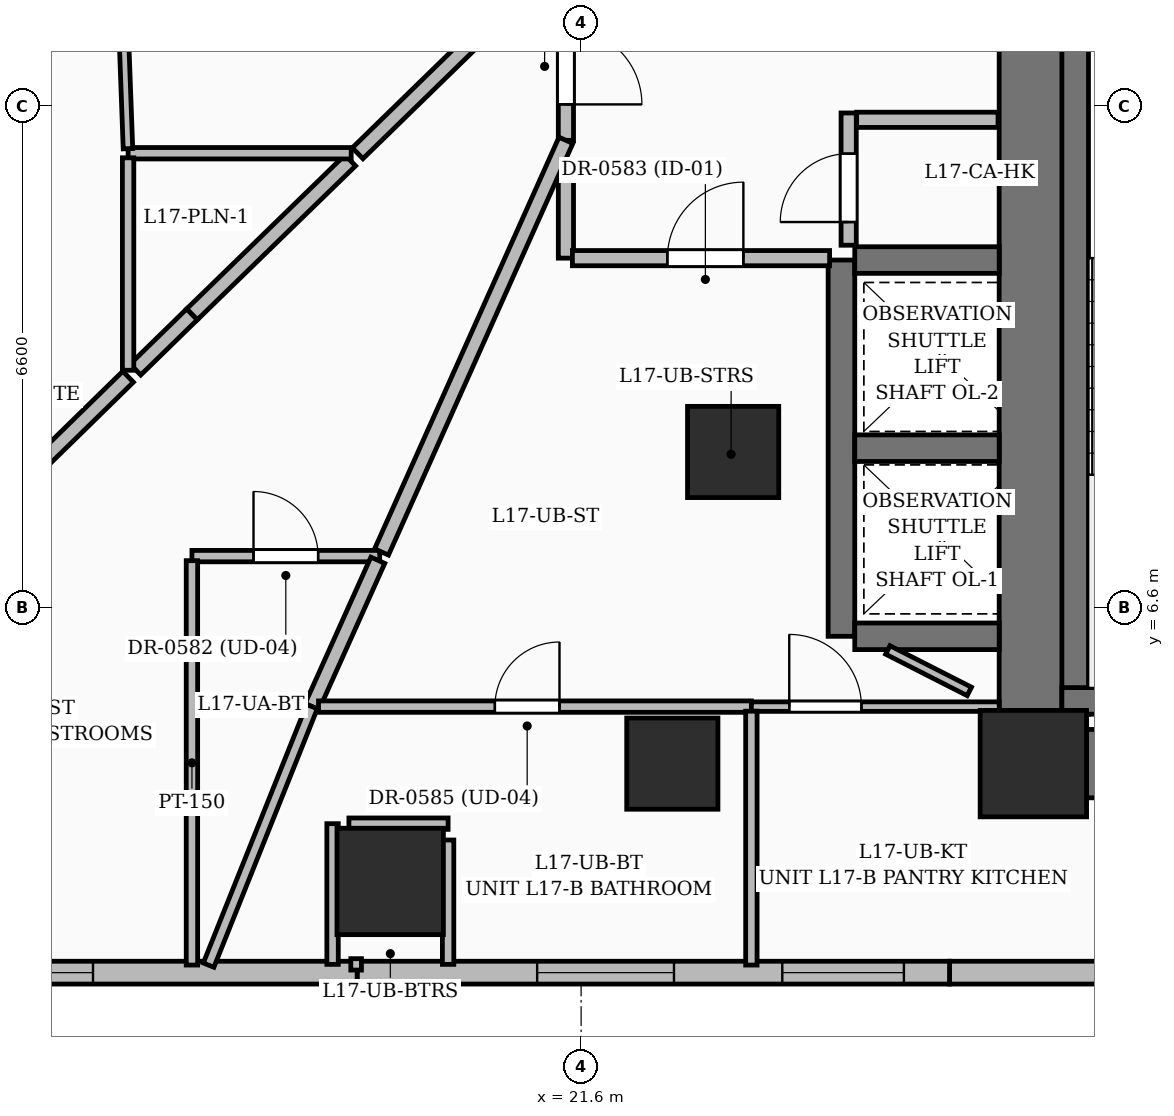
"""IFC4 building model, lengths in metres.
Left out: names, types, materials, properties, quantities, classifications, styles, units other than length and angle.
Written with IfcOpenShell. Run it as: python <this file> out.ifc"""

import sys

from ifc_helpers import new_model, si_unit, direction, frame, frame_2d, origin, origin_2d, place, context, subcontext, project, spatial, rectangle, extrude, element, fill, save


model = new_model("IFC4")
c1 = context("Model", 3, precision=1e-05, world=origin(), true_north=direction((0.0, 1.0)))
c2 = subcontext(c1, "Body", "Model", "MODEL_VIEW")
j1 = project(units=[si_unit("LENGTHUNIT", "METRE"), si_unit("PLANEANGLEUNIT", "RADIAN")], contexts=[c1])
p1 = place(None, origin())
s1 = spatial("IfcSite", under=j1, at=p1, CompositionType="ELEMENT")
p2 = place(p1, origin())
s2 = spatial("IfcBuilding", under=s1, at=p2, CompositionType="ELEMENT")
p3 = place(p2, frame((0.0, 0.0, 71.4)))
s3 = spatial("IfcBuildingStorey", under=s2, at=p3, CompositionType="ELEMENT", Elevation=71.4)
p4 = place(p3, frame((27.55, 4.55, 0.0), z_axis=(0.0, 0.0, 1.0), x_axis=(1.0, 0.0, 0.0)))
e1 = element("IfcColumn", 1, at=p4, inside=s3, PredefinedType="COLUMN", context=c2, shape_type="SweptSolid", body=[
    extrude(rectangle(XDim=1.4, YDim=1.4, at=origin_2d()), origin(), (0.0, 0.0, 1.0), 3.6),
])
for number, where, z_axis, x_axis in (
    (2, (22.8, 4.55, 0.0), (0.0, 0.0, 1.0), (1.0, 0.0, 0.0)),
    (3, (23.6, 8.65, 0.0), (0.0, 0.0, 1.0), (1.0, 0.0, 0.0)),
):
    element("IfcColumn", number, at=place(p3, frame(where, z_axis=z_axis, x_axis=x_axis)), inside=s3, PredefinedType="COLUMN", context=c2, shape_type="SweptSolid", body=[
        extrude(rectangle(XDim=1.2, YDim=1.2, at=origin_2d()), origin(), (0.0, 0.0, 1.0), 3.6),
    ])
p5 = place(p3, frame((28.25, 4.55, 0.0), z_axis=(0.0, 0.0, 1.0), x_axis=(1.0, 0.0, 0.0)))
e4 = element("IfcWall", 4, at=p5, inside=s3, PredefinedType="SHEAR", context=c2, shape_type="SweptSolid", body=[
    extrude(rectangle(XDim=6.2, YDim=0.9, at=frame_2d((3.1, 0.0))), origin(), (0.0, 0.0, 1.0), 3.6),
])
p6 = place(p3, frame((27.55, 5.25, 0.0), z_axis=(0.0, 0.0, 1.0), x_axis=(0.0, 1.0, 0.0)))
e5 = element("IfcWall", 5, at=p6, inside=s3, PredefinedType="SHEAR", context=c2, shape_type="SweptSolid", body=[
    extrude(rectangle(XDim=8.8, YDim=0.9, at=frame_2d((4.4, 0.0))), origin(), (0.0, 0.0, 1.0), 3.6),
])
p7 = place(p3, frame((28.1, 5.2, 0.0), z_axis=(0.0, 0.0, 1.0), x_axis=(0.0, 1.0, 0.0)))
e6 = element("IfcWall", 6, at=p7, inside=s3, PredefinedType="SOLIDWALL", context=c2, shape_type="SweptSolid", body=[
    extrude(rectangle(XDim=9.1, YDim=0.35, at=frame_2d((4.55, 0.0))), origin(), (0.0, 0.0, 1.0), 3.6),
])
p8 = place(p3, frame((27.925, 5.375, 0.0), z_axis=(0.0, 0.0, 1.0), x_axis=(1.0, 0.0, 0.0)))
e7 = element("IfcWall", 7, at=p8, inside=s3, PredefinedType="SOLIDWALL", context=c2, shape_type="SweptSolid", body=[
    extrude(rectangle(XDim=3.55, YDim=0.35, at=frame_2d((1.775, 0.0))), origin(), (0.0, 0.0, 1.0), 3.6),
])
p9 = place(p3, frame((25.025, 6.225, 0.0), z_axis=(0.0, 0.0, 1.0), x_axis=(0.0, 1.0, 0.0)))
e8 = element("IfcWall", 8, at=p9, inside=s3, PredefinedType="SOLIDWALL", context=c2, shape_type="SweptSolid", body=[
    extrude(rectangle(XDim=4.95, YDim=0.35, at=frame_2d((2.475, 0.0))), origin(), (0.0, 0.0, 1.0), 3.6),
])
for number, where, z_axis, x_axis in (
    (9, (25.2, 6.225, 0.0), (0.0, 0.0, 1.0), (1.0, 0.0, 0.0)),
    (10, (25.2, 8.7, 0.0), (0.0, 0.0, 1.0), (1.0, 0.0, 0.0)),
    (11, (25.2, 11.175, 0.0), (0.0, 0.0, 1.0), (1.0, 0.0, 0.0)),
):
    element("IfcWall", number, at=place(p3, frame(where, z_axis=z_axis, x_axis=x_axis)), inside=s3, PredefinedType="SOLIDWALL", context=c2, shape_type="SweptSolid", body=[
        extrude(rectangle(XDim=1.9, YDim=0.35, at=frame_2d((0.95, 0.0))), origin(), (0.0, 0.0, 1.0), 3.6),
    ])
p10 = place(p3, frame((19.088, 3.0, 0.0), z_axis=(0.0, 0.0, 1.0), x_axis=(1.0, 0.0, 0.0)))
e12 = element("IfcColumn", 12, at=p10, inside=s3, PredefinedType="COLUMN", context=c2, shape_type="SweptSolid", body=[
    extrude(rectangle(XDim=1.4, YDim=1.4, at=origin_2d()), origin(), (0.0, 0.0, 1.0), 3.6),
])
p11 = place(p3, frame((33.965, 1.8, 0.0), z_axis=(0.0, 0.0, 1.0), x_axis=(-1.0, 0.0, 0.0)))
e13 = element("IfcWall", 13, at=p11, inside=s3, PredefinedType="SOLIDWALL", context=c2, shape_type="SweptSolid", body=[
    extrude(rectangle(XDim=7.518, YDim=0.3, at=frame_2d((3.759, 0.0))), origin(), (0.0, 0.0, 1.0), 3.35),
])
p12 = place(p11, frame((2.45, 0.0, 0.55)))
e14 = element("IfcOpeningElement", 14, at=p12, cuts=e13, PredefinedType="OPENING", context=c2, shape_type="SweptSolid", body=[
    extrude(rectangle(XDim=2.1, YDim=2.4, at=frame_2d((1.05, 1.2))), frame((0.0, 0.16, 0.0), z_axis=(0.0, -1.0, 0.0), x_axis=(1.0, 0.0, 0.0)), (0.0, 0.0, 1.0), 0.32),
])
p13 = place(p3, frame((26.447, 1.8, 0.0), z_axis=(0.0, 0.0, 1.0), x_axis=(-1.0, 0.0, 0.0)))
e15 = element("IfcWall", 15, at=p13, inside=s3, PredefinedType="SOLIDWALL", context=c2, shape_type="SweptSolid", body=[
    extrude(rectangle(XDim=7.793, YDim=0.3, at=frame_2d((3.897, 0.0))), origin(), (0.0, 0.0, 1.0), 3.35),
])
p14 = place(p13, frame((3.625, 0.0, 0.6)))
e16 = element("IfcOpeningElement", 16, at=p14, cuts=e15, PredefinedType="OPENING", context=c2, shape_type="SweptSolid", body=[
    extrude(rectangle(XDim=1.8, YDim=2.1, at=frame_2d((0.9, 1.05))), frame((0.0, 0.16, 0.0), z_axis=(0.0, -1.0, 0.0), x_axis=(1.0, 0.0, 0.0)), (0.0, 0.0, 1.0), 0.32),
])
p15 = place(p13, frame((0.6, 0.0, 0.55)))
e17 = element("IfcOpeningElement", 17, at=p15, cuts=e15, PredefinedType="OPENING", context=c2, shape_type="SweptSolid", body=[
    extrude(rectangle(XDim=1.6, YDim=2.2, at=frame_2d((0.8, 1.1))), frame((0.0, 0.16, 0.0), z_axis=(0.0, -1.0, 0.0), x_axis=(1.0, 0.0, 0.0)), (0.0, 0.0, 1.0), 0.32),
])
p16 = place(p3, frame((18.653, 1.8, 0.0), z_axis=(0.0, 0.0, 1.0), x_axis=(-1.0, 0.0, 0.0)))
e18 = element("IfcWall", 18, at=p16, inside=s3, PredefinedType="SOLIDWALL", context=c2, shape_type="SweptSolid", body=[
    extrude(rectangle(XDim=7.793, YDim=0.3, at=frame_2d((3.896, 0.0))), origin(), (0.0, 0.0, 1.0), 3.35),
])
p17 = place(p16, frame((3.475, 0.0, 0.55)))
e19 = element("IfcOpeningElement", 19, at=p17, cuts=e18, PredefinedType="OPENING", context=c2, shape_type="SweptSolid", body=[
    extrude(rectangle(XDim=1.6, YDim=2.2, at=frame_2d((0.8, 1.1))), frame((0.0, 0.16, 0.0), z_axis=(0.0, -1.0, 0.0), x_axis=(1.0, 0.0, 0.0)), (0.0, 0.0, 1.0), 0.32),
])
p18 = place(p3, frame((12.386, 12.079, 0.0), z_axis=(0.0, 0.0, 1.0), x_axis=(0.539509086386, 0.841979777493, 0.0)))
e20 = element("IfcWall", 20, at=p18, inside=s3, PredefinedType="SOLIDWALL", context=c2, shape_type="SweptSolid", body=[
    extrude(rectangle(XDim=7.149, YDim=0.3, at=frame_2d((3.574, 0.0))), origin(), (0.0, 0.0, 1.0), 3.35),
])
p19 = place(p18, frame((1.85, 0.0, 0.55)))
e21 = element("IfcOpeningElement", 21, at=p19, cuts=e20, PredefinedType="OPENING", context=c2, shape_type="SweptSolid", body=[
    extrude(rectangle(XDim=1.6, YDim=2.2, at=frame_2d((0.8, 1.1))), frame((0.0, 0.16, 0.0), z_axis=(0.0, -1.0, 0.0), x_axis=(1.0, 0.0, 0.0)), (0.0, 0.0, 1.0), 0.32),
])
p20 = place(p3, frame((25.12, 11.37, 0.0), z_axis=(0.0, 0.0, 1.0), x_axis=(0.0, 1.0, 0.0)))
e22 = element("IfcWall", 22, at=p20, inside=s3, PredefinedType="PARTITIONING", context=c2, shape_type="SweptSolid", body=[
    extrude(rectangle(XDim=1.74, YDim=0.2, at=frame_2d((0.87, 0.0))), origin(), (0.0, 0.0, 1.0), 3.35),
])
p21 = place(p20, frame((0.305, 0.0, 0.0)))
e23 = element("IfcOpeningElement", 23, at=p21, cuts=e22, PredefinedType="OPENING", context=c2, shape_type="SweptSolid", body=[
    extrude(rectangle(XDim=0.9, YDim=2.1, at=frame_2d((0.45, 1.05))), frame((0.0, 0.11, 0.0), z_axis=(0.0, -1.0, 0.0), x_axis=(1.0, 0.0, 0.0)), (0.0, 0.0, 1.0), 0.22),
])
p22 = place(p3, frame((25.225, 13.02, 0.0), z_axis=(0.0, 0.0, 1.0), x_axis=(1.0, 0.0, 0.0)))
e24 = element("IfcWall", 24, at=p22, inside=s3, PredefinedType="PARTITIONING", context=c2, shape_type="SweptSolid", body=[
    extrude(rectangle(XDim=1.86, YDim=0.2, at=frame_2d((0.93, 0.0))), origin(), (0.0, 0.0, 1.0), 3.35),
])
p23 = place(p3, frame((21.4, 15.09, 0.0), z_axis=(0.0, 0.0, 1.0), x_axis=(0.0, -1.0, 0.0)))
e25 = element("IfcWall", 25, at=p23, inside=s3, PredefinedType="PARTITIONING", context=c2, shape_type="SweptSolid", body=[
    extrude(rectangle(XDim=2.34, YDim=0.2, at=frame_2d((1.17, 0.0))), origin(), (0.0, 0.0, 1.0), 2.86),
])
p24 = place(p23, frame((0.867, 0.0, 0.0)))
e26 = element("IfcOpeningElement", 26, at=p24, cuts=e25, PredefinedType="OPENING", context=c2, shape_type="SweptSolid", body=[
    extrude(rectangle(XDim=1.0, YDim=2.2, at=frame_2d((0.5, 1.1))), frame((0.0, 0.11, 0.0), z_axis=(0.0, -1.0, 0.0), x_axis=(1.0, 0.0, 0.0)), (0.0, 0.0, 1.0), 0.22),
])
p25 = place(p3, frame((21.4, 12.261, 0.0), z_axis=(0.0, 0.0, 1.0), x_axis=(0.0, -1.0, 0.0)))
e27 = element("IfcWall", 27, at=p25, inside=s3, PredefinedType="PARTITIONING", context=c2, shape_type="SweptSolid", body=[
    extrude(rectangle(XDim=1.061, YDim=0.2, at=frame_2d((0.53, 0.0))), origin(), (0.0, 0.0, 1.0), 3.35),
])
p26 = place(p3, frame((21.485, 11.2, 0.0), z_axis=(0.0, 0.0, 1.0), x_axis=(1.0, 0.0, 0.0)))
e28 = element("IfcWall", 28, at=p26, inside=s3, PredefinedType="PARTITIONING", context=c2, shape_type="SweptSolid", body=[
    extrude(rectangle(XDim=3.384, YDim=0.2, at=frame_2d((1.692, 0.0))), origin(), (0.0, 0.0, 1.0), 2.86),
])
p27 = place(p26, frame((1.25, 0.0, 0.0)))
e29 = element("IfcOpeningElement", 29, at=p27, cuts=e28, PredefinedType="OPENING", context=c2, shape_type="SweptSolid", body=[
    extrude(rectangle(XDim=1.0, YDim=2.2, at=frame_2d((0.5, 1.1))), frame((0.0, 0.11, 0.0), z_axis=(0.0, -1.0, 0.0), x_axis=(1.0, 0.0, 0.0)), (0.0, 0.0, 1.0), 0.22),
])
p28 = place(p3, frame((16.48, 7.28, 0.0), z_axis=(0.0, 0.0, 1.0), x_axis=(1.0, 0.0, 0.0)))
e30 = element("IfcWall", 30, at=p28, inside=s3, PredefinedType="PARTITIONING", context=c2, shape_type="SweptSolid", body=[
    extrude(rectangle(XDim=2.47, YDim=0.15, at=frame_2d((1.235, 0.0))), origin(), (0.0, 0.0, 1.0), 2.37),
])
p29 = place(p28, frame((0.81, 0.0, 0.0)))
e31 = element("IfcOpeningElement", 31, at=p29, cuts=e30, PredefinedType="OPENING", context=c2, shape_type="SweptSolid", body=[
    extrude(rectangle(XDim=0.85, YDim=2.1, at=frame_2d((0.425, 1.05))), frame((0.0, 0.085, 0.0), z_axis=(0.0, -1.0, 0.0), x_axis=(1.0, 0.0, 0.0)), (0.0, 0.0, 1.0), 0.17),
])
p30 = place(p3, frame((18.975, 7.335, 0.0), z_axis=(0.0, 0.0, 1.0), x_axis=(0.408740443591, 0.912650672367, 0.0)))
e32 = element("IfcWall", 32, at=p30, inside=s3, PredefinedType="PARTITIONING", context=c2, shape_type="SweptSolid", body=[
    extrude(rectangle(XDim=5.934, YDim=0.2, at=frame_2d((2.967, 0.0))), origin(), (0.0, 0.0, 1.0), 1.12),
])
p31 = place(p3, frame((21.339, 15.191, 0.0), z_axis=(0.0, 0.0, 1.0), x_axis=(-0.716217041319, -0.697877603684, 0.0)))
e33 = element("IfcWall", 33, at=p31, inside=s3, PredefinedType="PARTITIONING", context=c2, shape_type="SweptSolid", body=[
    extrude(rectangle(XDim=3.741, YDim=0.2, at=frame_2d((1.87, 0.0))), origin(), (0.0, 0.0, 1.0), 3.35),
])
p32 = place(p3, frame((18.563, 12.486, 0.0), z_axis=(0.0, 0.0, 1.0), x_axis=(-0.716909764219, -0.697165970173, 0.0)))
e34 = element("IfcWall", 34, at=p32, inside=s3, PredefinedType="PARTITIONING", context=c2, shape_type="SweptSolid", body=[
    extrude(rectangle(XDim=2.906, YDim=0.2, at=frame_2d((1.453, 0.0))), origin(), (0.0, 0.0, 1.0), 1.12),
])
p33 = place(p3, frame((16.48, 7.22, 0.0), z_axis=(0.0, 0.0, 1.0), x_axis=(0.0, -1.0, 0.0)))
e35 = element("IfcWall", 35, at=p33, inside=s3, PredefinedType="PARTITIONING", context=c2, shape_type="SweptSolid", body=[
    extrude(rectangle(XDim=5.32, YDim=0.15, at=frame_2d((2.66, 0.0))), origin(), (0.0, 0.0, 1.0), 2.37),
])
p34 = place(p3, frame((18.06, 5.3, 0.0), z_axis=(0.0, 0.0, 1.0), x_axis=(0.409912552127, 0.912124826769, 0.0)))
e36 = element("IfcWall", 36, at=p34, inside=s3, PredefinedType="PARTITIONING", context=c2, shape_type="SweptSolid", body=[
    extrude(rectangle(XDim=2.111, YDim=0.2, at=frame_2d((1.055, 0.0))), origin(), (0.0, 0.0, 1.0), 3.35),
])
p35 = place(p3, frame((16.48, 10.46, 0.0), z_axis=(0.0, 0.0, 1.0), x_axis=(-0.715632941053, -0.69847655199, 0.0)))
e37 = element("IfcWall", 37, at=p35, inside=s3, PredefinedType="PARTITIONING", context=c2, shape_type="SweptSolid", body=[
    extrude(rectangle(XDim=1.039, YDim=0.2, at=frame_2d((0.52, 0.0))), origin(), (0.0, 0.0, 1.0), 1.12),
])
p36 = place(p3, frame((15.64, 9.64, 0.0), z_axis=(0.0, 0.0, 1.0), x_axis=(-0.714989565671, -0.69913512355, 0.0)))
e38 = element("IfcWall", 38, at=p36, inside=s3, PredefinedType="PARTITIONING", context=c2, shape_type="SweptSolid", body=[
    extrude(rectangle(XDim=5.867, YDim=0.2, at=frame_2d((2.934, 0.0))), origin(), (0.0, 0.0, 1.0), 2.37),
])
p37 = place(p3, frame((18.145, 5.3, 0.0), z_axis=(0.0, 0.0, 1.0), x_axis=(1.0, 0.0, 0.0)))
e39 = element("IfcWall", 39, at=p37, inside=s3, PredefinedType="PARTITIONING", context=c2, shape_type="SweptSolid", body=[
    extrude(rectangle(XDim=5.695, YDim=0.15, at=frame_2d((2.848, 0.0))), origin(), (0.0, 0.0, 1.0), 3.35),
])
p38 = place(p37, frame((2.32, 0.0, 0.0)))
e40 = element("IfcOpeningElement", 40, at=p38, cuts=e39, PredefinedType="OPENING", context=c2, shape_type="SweptSolid", body=[
    extrude(rectangle(XDim=0.85, YDim=2.1, at=frame_2d((0.425, 1.05))), frame((0.0, 0.085, 0.0), z_axis=(0.0, -1.0, 0.0), x_axis=(1.0, 0.0, 0.0)), (0.0, 0.0, 1.0), 0.17),
])
p39 = place(p3, frame((23.84, 5.3, 0.0), z_axis=(0.0, 0.0, 1.0), x_axis=(1.0, 0.0, 0.0)))
e41 = element("IfcWall", 41, at=p39, inside=s3, PredefinedType="PARTITIONING", context=c2, shape_type="SweptSolid", body=[
    extrude(rectangle(XDim=3.26, YDim=0.125, at=frame_2d((1.63, 0.0))), origin(), (0.0, 0.0, 1.0), 3.35),
])
p40 = place(p39, frame((0.498, 0.0, 0.0)))
e42 = element("IfcOpeningElement", 42, at=p40, cuts=e41, PredefinedType="OPENING", context=c2, shape_type="SweptSolid", body=[
    extrude(rectangle(XDim=0.95, YDim=2.2, at=frame_2d((0.475, 1.1))), frame((0.0, 0.072, 0.0), z_axis=(0.0, -1.0, 0.0), x_axis=(1.0, 0.0, 0.0)), (0.0, 0.0, 1.0), 0.145),
])
p41 = place(p3, frame((23.84, 1.9, 0.0), z_axis=(0.0, 0.0, 1.0), x_axis=(0.0, 1.0, 0.0)))
e43 = element("IfcWall", 43, at=p41, inside=s3, PredefinedType="PARTITIONING", context=c2, shape_type="SweptSolid", body=[
    extrude(rectangle(XDim=3.34, YDim=0.15, at=frame_2d((1.67, 0.0))), origin(), (0.0, 0.0, 1.0), 1.12),
])
p42 = place(p3, frame((15.64, 12.58, 0.0), z_axis=(0.0, 0.0, 1.0), x_axis=(1.0, 0.0, 0.0)))
e44 = element("IfcWall", 44, at=p42, inside=s3, PredefinedType="PARTITIONING", context=c2, shape_type="SweptSolid", body=[
    extrude(rectangle(XDim=2.935, YDim=0.15, at=frame_2d((1.468, 0.0))), origin(), (0.0, 0.0, 1.0), 3.35),
])
p43 = place(p3, frame((15.49, 16.678, 0.0), z_axis=(0.0, 0.0, 1.0), x_axis=(0.036674223431, -0.999327274388, 0.0)))
e45 = element("IfcWall", 45, at=p43, inside=s3, PredefinedType="PARTITIONING", context=c2, shape_type="SweptSolid", body=[
    extrude(rectangle(XDim=4.041, YDim=0.125, at=frame_2d((2.021, 0.0))), origin(), (0.0, 0.0, 1.0), 2.37),
])
p44 = place(p43, frame((1.393, 0.0, 0.0)))
e46 = element("IfcOpeningElement", 46, at=p44, cuts=e45, PredefinedType="OPENING", context=c2, shape_type="SweptSolid", body=[
    extrude(rectangle(XDim=0.95, YDim=2.2, at=frame_2d((0.475, 1.1))), frame((0.0, 0.072, 0.0), z_axis=(0.0, -1.0, 0.0), x_axis=(1.0, 0.0, 0.0)), (0.0, 0.0, 1.0), 0.145),
])
p45 = place(p3, frame((15.64, 12.52, 0.0), z_axis=(0.0, 0.0, 1.0), x_axis=(0.0, -1.0, 0.0)))
e47 = element("IfcWall", 47, at=p45, inside=s3, PredefinedType="PARTITIONING", context=c2, shape_type="SweptSolid", body=[
    extrude(rectangle(XDim=2.795, YDim=0.15, at=frame_2d((1.397, 0.0))), origin(), (0.0, 0.0, 1.0), 1.12),
])
p46 = place(p3, frame((25.635, 6.046, 0.0), z_axis=(0.0, 0.0, 1.0), x_axis=(0.891197428161, -0.453615634694, 0.0)))
e48 = element("IfcWall", 48, at=p46, inside=s3, PredefinedType="PARTITIONING", context=c2, shape_type="SweptSolid", body=[
    extrude(rectangle(XDim=1.203, YDim=0.125, at=frame_2d((0.602, 0.0))), origin(), (0.0, 0.0, 1.0), 3.35),
])
p47 = place(p3, frame((18.71, 1.909, 0.0), z_axis=(0.0, 0.0, 1.0), x_axis=(-1.0, 0.0, 0.0)))
e49 = element("IfcWall", 49, at=p47, inside=s3, PredefinedType="PARTITIONING", context=c2, shape_type="SweptSolid", body=[
    extrude(rectangle(XDim=0.14, YDim=0.15, at=frame_2d((0.07, 0.0))), origin(), (0.0, 0.0, 1.0), 3.35),
])
p48 = place(p3, frame((18.33, 1.909, 0.0), z_axis=(0.0, 0.0, 1.0), x_axis=(0.0, 1.0, 0.0)))
e50 = element("IfcWall", 50, at=p48, inside=s3, PredefinedType="PARTITIONING", context=c2, shape_type="SweptSolid", body=[
    extrude(rectangle(XDim=1.851, YDim=0.15, at=frame_2d((0.926, 0.0))), origin(), (0.0, 0.0, 1.0), 2.37),
])
p49 = place(p3, frame((18.545, 3.76, 0.0), z_axis=(0.0, 0.0, 1.0), x_axis=(1.0, 0.0, 0.0)))
e51 = element("IfcWall", 51, at=p49, inside=s3, PredefinedType="PARTITIONING", context=c2, shape_type="SweptSolid", body=[
    extrude(rectangle(XDim=1.305, YDim=0.15, at=frame_2d((0.653, 0.0))), origin(), (0.0, 0.0, 1.0), 2.37),
])
p50 = place(p3, frame((19.85, 3.545, 0.0), z_axis=(0.0, 0.0, 1.0), x_axis=(0.0, -1.0, 0.0)))
e52 = element("IfcWall", 52, at=p50, inside=s3, PredefinedType="PARTITIONING", context=c2, shape_type="SweptSolid", body=[
    extrude(rectangle(XDim=1.636, YDim=0.15, at=frame_2d((0.818, 0.0))), origin(), (0.0, 0.0, 1.0), 1.12),
])
p51 = place(p3, frame((18.06, 5.3, 0.0), z_axis=(0.0, 0.0, 1.0), x_axis=(-0.371540045928, -0.928416929117, 0.0)))
e53 = element("IfcWall", 53, at=p51, inside=s3, PredefinedType="PARTITIONING", context=c2, shape_type="SweptSolid", body=[
    extrude(rectangle(XDim=3.663, YDim=0.15, at=frame_2d((1.832, 0.0))), origin(), (0.0, 0.0, 1.0), 2.37),
])
p52 = place(p14, origin())
e54 = element("IfcWindow", 54, at=p52, inside=s3, PartitioningType="SINGLE_PANEL", PredefinedType="WINDOW", context=c2, shape_type="SweptSolid", body=[
    extrude(rectangle(XDim=1.8, YDim=2.1, at=frame_2d((0.9, 1.05))), frame((0.0, 0.03, 0.0), z_axis=(0.0, -1.0, 0.0), x_axis=(1.0, 0.0, 0.0)), (0.0, 0.0, 1.0), 0.06),
])
fill(e16, e54)
p53 = place(p15, origin())
e55 = element("IfcWindow", 55, at=p53, inside=s3, PartitioningType="SINGLE_PANEL", PredefinedType="WINDOW", context=c2, shape_type="SweptSolid", body=[
    extrude(rectangle(XDim=1.6, YDim=2.2, at=frame_2d((0.8, 1.1))), frame((0.0, 0.03, 0.0), z_axis=(0.0, -1.0, 0.0), x_axis=(1.0, 0.0, 0.0)), (0.0, 0.0, 1.0), 0.06),
])
fill(e17, e55)
p54 = place(p17, origin())
e56 = element("IfcWindow", 56, at=p54, inside=s3, PartitioningType="SINGLE_PANEL", PredefinedType="WINDOW", context=c2, shape_type="SweptSolid", body=[
    extrude(rectangle(XDim=1.6, YDim=2.2, at=frame_2d((0.8, 1.1))), frame((0.0, 0.03, 0.0), z_axis=(0.0, -1.0, 0.0), x_axis=(1.0, 0.0, 0.0)), (0.0, 0.0, 1.0), 0.06),
])
fill(e19, e56)
p55 = place(p21, origin())
e57 = element("IfcDoor", 57, at=p55, inside=s3, OperationType="SINGLE_SWING_LEFT", PredefinedType="DOOR", context=c2, shape_type="SweptSolid", body=[
    extrude(rectangle(XDim=0.9, YDim=2.1, at=frame_2d((0.45, 1.05))), frame((0.0, 0.025, 0.0), z_axis=(0.0, -1.0, 0.0), x_axis=(1.0, 0.0, 0.0)), (0.0, 0.0, 1.0), 0.05),
])
fill(e23, e57)
p56 = place(p24, origin())
e58 = element("IfcDoor", 58, at=p56, inside=s3, OperationType="SINGLE_SWING_RIGHT", PredefinedType="DOOR", context=c2, shape_type="SweptSolid", body=[
    extrude(rectangle(XDim=1.0, YDim=2.2, at=frame_2d((0.5, 1.1))), frame((0.0, 0.025, 0.0), z_axis=(0.0, -1.0, 0.0), x_axis=(1.0, 0.0, 0.0)), (0.0, 0.0, 1.0), 0.05),
])
fill(e26, e58)
p57 = place(p29, origin())
e59 = element("IfcDoor", 59, at=p57, inside=s3, OperationType="SINGLE_SWING_LEFT", PredefinedType="DOOR", context=c2, shape_type="SweptSolid", body=[
    extrude(rectangle(XDim=0.85, YDim=2.1, at=frame_2d((0.425, 1.05))), frame((0.0, 0.025, 0.0), z_axis=(0.0, -1.0, 0.0), x_axis=(1.0, 0.0, 0.0)), (0.0, 0.0, 1.0), 0.05),
])
fill(e31, e59)
p58 = place(p27, origin())
e60 = element("IfcDoor", 60, at=p58, inside=s3, OperationType="SINGLE_SWING_RIGHT", PredefinedType="DOOR", context=c2, shape_type="SweptSolid", body=[
    extrude(rectangle(XDim=1.0, YDim=2.2, at=frame_2d((0.5, 1.1))), frame((0.0, 0.025, 0.0), z_axis=(0.0, -1.0, 0.0), x_axis=(1.0, 0.0, 0.0)), (0.0, 0.0, 1.0), 0.05),
])
fill(e29, e60)
p59 = place(p40, origin())
e61 = element("IfcDoor", 61, at=p59, inside=s3, OperationType="SINGLE_SWING_LEFT", PredefinedType="DOOR", context=c2, shape_type="SweptSolid", body=[
    extrude(rectangle(XDim=0.95, YDim=2.2, at=frame_2d((0.475, 1.1))), frame((0.0, 0.025, 0.0), z_axis=(0.0, -1.0, 0.0), x_axis=(1.0, 0.0, 0.0)), (0.0, 0.0, 1.0), 0.05),
])
fill(e42, e61)
p60 = place(p38, origin())
e62 = element("IfcDoor", 62, at=p60, inside=s3, OperationType="SINGLE_SWING_RIGHT", PredefinedType="DOOR", context=c2, shape_type="SweptSolid", body=[
    extrude(rectangle(XDim=0.85, YDim=2.1, at=frame_2d((0.425, 1.05))), frame((0.0, 0.025, 0.0), z_axis=(0.0, -1.0, 0.0), x_axis=(1.0, 0.0, 0.0)), (0.0, 0.0, 1.0), 0.05),
])
fill(e40, e62)
save(model, sys.argv[1])
